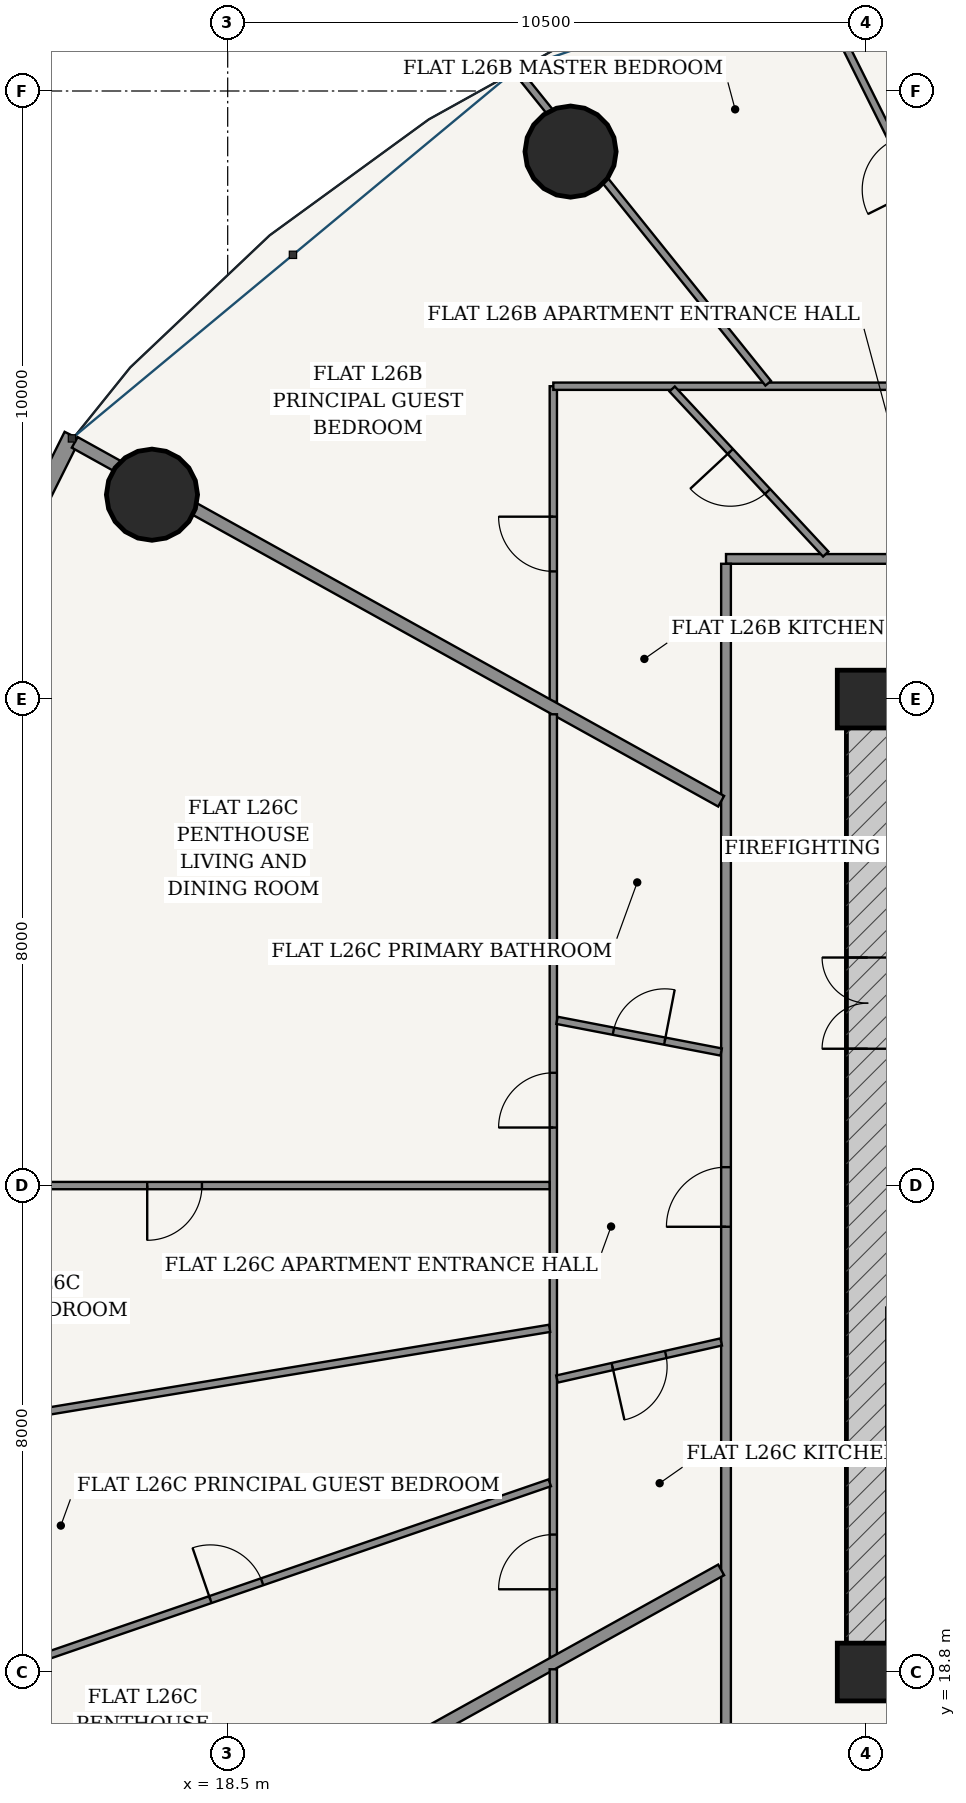
"""IFC4 building model, lengths in metres.
Left out: names, types, materials, properties, quantities, classifications, styles, units other than length and angle.
Written with IfcOpenShell. Run it as: python <this file> out.ifc"""

import sys

from ifc_helpers import new_model, si_unit, direction, frame, frame_2d, origin, origin_2d, place, context, subcontext, project, spatial, rectangle, hollow_circle, extrude, source, transform, mapped, element, fill, save


model = new_model("IFC4")
c1 = context("Model", 3, precision=1e-05, world=origin(), true_north=direction((-0.2419218956, 0.970295726276)))
c2 = subcontext(c1, "Body", "Model", "MODEL_VIEW")
j1 = project(units=[si_unit("LENGTHUNIT", "METRE"), si_unit("PLANEANGLEUNIT", "RADIAN")], contexts=[c1])
p1 = place(None, origin())
s1 = spatial("IfcSite", under=j1, at=p1, CompositionType="ELEMENT")
p2 = place(p1, origin())
s2 = spatial("IfcBuilding", under=s1, at=p2, CompositionType="ELEMENT")
p3 = place(p2, frame((0.0, 0.0, 101.4)))
s3 = spatial("IfcBuildingStorey", under=s2, at=p3, CompositionType="ELEMENT", Elevation=101.4)
for number, where, z_axis, x_axis in (
    (1, (29.0, 18.8, 0.0), (0.0, 0.0, 1.0), (1.0, 0.0, 0.0)),
    (2, (29.0, 34.8, 0.0), (0.0, 0.0, 1.0), (1.0, 0.0, 0.0)),
):
    element("IfcColumn", number, at=place(p3, frame(where, z_axis=z_axis, x_axis=x_axis)), inside=s3, PredefinedType="COLUMN", context=c2, shape_type="SweptSolid", body=[
        extrude(rectangle(XDim=0.95, YDim=0.95, at=origin_2d()), origin(), (0.0, 0.0, 1.0), 3.6),
    ])
p4 = place(p3, frame((28.675, 18.825, 0.0), z_axis=(0.0, 0.0, 1.0), x_axis=(1.0, 0.0, 0.0)))
e3 = element("IfcWall", 3, at=p4, inside=s3, PredefinedType="SHEAR", context=c2, shape_type="SweptSolid", body=[
    extrude(rectangle(XDim=18.65, YDim=0.7, at=frame_2d((9.325, 0.0))), origin(), (0.0, 0.0, 1.0), 3.325),
])
p5 = place(p4, frame((6.877, 0.0, 0.0)))
e4 = element("IfcOpeningElement", 4, at=p5, cuts=e3, PredefinedType="OPENING", context=c2, shape_type="SweptSolid", body=[
    extrude(rectangle(XDim=0.85, YDim=2.1, at=frame_2d((0.425, 1.05))), frame((0.0, 0.36, 0.0), z_axis=(0.0, -1.0, 0.0), x_axis=(1.0, 0.0, 0.0)), (0.0, 0.0, 1.0), 0.72),
])
p6 = place(p4, frame((8.9, 0.0, 0.0)))
e5 = element("IfcOpeningElement", 5, at=p6, cuts=e3, PredefinedType="OPENING", context=c2, shape_type="SweptSolid", body=[
    extrude(rectangle(XDim=0.85, YDim=2.1, at=frame_2d((0.425, 1.05))), frame((0.0, 0.36, 0.0), z_axis=(0.0, -1.0, 0.0), x_axis=(1.0, 0.0, 0.0)), (0.0, 0.0, 1.0), 0.72),
])
p7 = place(p4, frame((10.923, 0.0, 0.0)))
e6 = element("IfcOpeningElement", 6, at=p7, cuts=e3, PredefinedType="OPENING", context=c2, shape_type="SweptSolid", body=[
    extrude(rectangle(XDim=0.85, YDim=2.1, at=frame_2d((0.425, 1.05))), frame((0.0, 0.36, 0.0), z_axis=(0.0, -1.0, 0.0), x_axis=(1.0, 0.0, 0.0)), (0.0, 0.0, 1.0), 0.72),
])
p8 = place(p3, frame((28.675, 34.775, 0.0), z_axis=(0.0, 0.0, 1.0), x_axis=(1.0, 0.0, 0.0)))
e7 = element("IfcWall", 7, at=p8, inside=s3, PredefinedType="SHEAR", context=c2, shape_type="SweptSolid", body=[
    extrude(rectangle(XDim=18.65, YDim=0.7, at=frame_2d((9.325, 0.0))), origin(), (0.0, 0.0, 1.0), 3.325),
])
p9 = place(p8, frame((7.357, 0.0, 0.0)))
e8 = element("IfcOpeningElement", 8, at=p9, cuts=e7, PredefinedType="OPENING", context=c2, shape_type="SweptSolid", body=[
    extrude(rectangle(XDim=0.86, YDim=2.1, at=frame_2d((0.43, 1.05))), frame((0.0, 0.36, 0.0), z_axis=(0.0, -1.0, 0.0), x_axis=(1.0, 0.0, 0.0)), (0.0, 0.0, 1.0), 0.72),
])
p10 = place(p8, frame((10.438, 0.0, 0.0)))
e9 = element("IfcOpeningElement", 9, at=p10, cuts=e7, PredefinedType="OPENING", context=c2, shape_type="SweptSolid", body=[
    extrude(rectangle(XDim=0.85, YDim=2.1, at=frame_2d((0.425, 1.05))), frame((0.0, 0.36, 0.0), z_axis=(0.0, -1.0, 0.0), x_axis=(1.0, 0.0, 0.0)), (0.0, 0.0, 1.0), 0.72),
])
p11 = place(p3, frame((29.025, 19.175, 0.0), z_axis=(0.0, 0.0, 1.0), x_axis=(0.0, 1.0, 0.0)))
e10 = element("IfcWall", 10, at=p11, inside=s3, PredefinedType="SHEAR", context=c2, shape_type="SweptSolid", body=[
    extrude(rectangle(XDim=15.25, YDim=0.7, at=frame_2d((7.625, 0.0))), origin(), (0.0, 0.0, 1.0), 3.325),
])
p12 = place(p11, frame((9.875, 0.0, 0.0)))
e11 = element("IfcOpeningElement", 11, at=p12, cuts=e10, PredefinedType="OPENING", context=c2, shape_type="SweptSolid", body=[
    extrude(rectangle(XDim=1.5, YDim=2.2, at=frame_2d((0.75, 1.1))), frame((0.0, 0.36, 0.0), z_axis=(0.0, -1.0, 0.0), x_axis=(1.0, 0.0, 0.0)), (0.0, 0.0, 1.0), 0.72),
])
for number, where, z_axis, x_axis in (
    (12, (24.138, 43.803, 0.0), (0.0, 0.0, 1.0), (1.0, 0.0, 0.0)),
    (13, (17.255, 38.161, 0.0), (0.0, 0.0, 1.0), (1.0, 0.0, 0.0)),
):
    element("IfcColumn", number, at=place(p3, frame(where, z_axis=z_axis, x_axis=x_axis)), inside=s3, PredefinedType="COLUMN", context=c2, shape_type="SweptSolid", body=[
        extrude(hollow_circle(Radius=0.75, WallThickness=0.045, at=origin_2d()), origin(), (0.0, 0.0, 1.0), 3.6),
    ])
p13 = place(p3, frame((15.944, 39.133, 0.0), z_axis=(0.0, 0.0, 1.0), x_axis=(-0.446263788661, -0.894901464369, 0.0)))
e14 = element("IfcWall", 14, at=p13, inside=s3, PredefinedType="SOLIDWALL", context=c2, shape_type="SweptSolid", body=[
    extrude(rectangle(XDim=9.05, YDim=0.28, at=frame_2d((4.525, 0.0))), origin(), (0.0, 0.0, 1.0), 3.325),
])
p14 = place(p13, frame((1.394, 0.0, 0.85)))
e15 = element("IfcOpeningElement", 15, at=p14, cuts=e14, PredefinedType="OPENING", context=c2, shape_type="SweptSolid", body=[
    extrude(rectangle(XDim=2.1, YDim=1.95, at=frame_2d((1.05, 0.975))), frame((0.0, 0.15, 0.0), z_axis=(0.0, -1.0, 0.0), x_axis=(1.0, 0.0, 0.0)), (0.0, 0.0, 1.0), 0.3),
])
p15 = place(p13, frame((5.557, 0.0, 0.85)))
e16 = element("IfcOpeningElement", 16, at=p15, cuts=e14, PredefinedType="OPENING", context=c2, shape_type="SweptSolid", body=[
    extrude(rectangle(XDim=2.1, YDim=1.95, at=frame_2d((1.05, 0.975))), frame((0.0, 0.15, 0.0), z_axis=(0.0, -1.0, 0.0), x_axis=(1.0, 0.0, 0.0)), (0.0, 0.0, 1.0), 0.3),
])
p16 = place(p3, frame((26.695, 37.105, 0.0), z_axis=(0.0, 0.0, 1.0), x_axis=(1.0, 0.0, 0.0)))
e17 = element("IfcWall", 17, at=p16, inside=s3, PredefinedType="PARTITIONING", context=c2, shape_type="SweptSolid", body=[
    extrude(rectangle(XDim=22.61, YDim=0.16, at=frame_2d((11.305, 0.0))), origin(), (0.0, 0.0, 1.0), 2.767),
])
p17 = place(p16, frame((4.925, 0.0, 0.0)))
e18 = element("IfcOpeningElement", 18, at=p17, cuts=e17, PredefinedType="OPENING", context=c2, shape_type="SweptSolid", body=[
    extrude(rectangle(XDim=0.98, YDim=2.2, at=frame_2d((0.49, 1.1))), frame((0.0, 0.09, 0.0), z_axis=(0.0, -1.0, 0.0), x_axis=(1.0, 0.0, 0.0)), (0.0, 0.0, 1.0), 0.18),
])
p18 = place(p3, frame((26.695, 16.575, 0.0), z_axis=(0.0, 0.0, 1.0), x_axis=(0.0, 1.0, 0.0)))
e19 = element("IfcWall", 19, at=p18, inside=s3, PredefinedType="PARTITIONING", context=c2, shape_type="SweptSolid", body=[
    extrude(rectangle(XDim=20.45, YDim=0.16, at=frame_2d((10.225, 0.0))), origin(), (0.0, 0.0, 1.0), 2.767),
])
p19 = place(p18, frame((9.547, 0.0, 0.0)))
e20 = element("IfcOpeningElement", 20, at=p19, cuts=e19, PredefinedType="OPENING", context=c2, shape_type="SweptSolid", body=[
    extrude(rectangle(XDim=0.98, YDim=2.2, at=frame_2d((0.49, 1.1))), frame((0.0, 0.09, 0.0), z_axis=(0.0, -1.0, 0.0), x_axis=(1.0, 0.0, 0.0)), (0.0, 0.0, 1.0), 0.18),
])
p20 = place(p3, frame((23.855, 34.754, 0.0), z_axis=(0.0, 0.0, 1.0), x_axis=(0.0, 1.0, 0.0)))
e21 = element("IfcWall", 21, at=p20, inside=s3, PredefinedType="PARTITIONING", context=c2, shape_type="SweptSolid", body=[
    extrude(rectangle(XDim=5.191, YDim=0.12, at=frame_2d((2.595, 0.0))), origin(), (0.0, 0.0, 1.0), 3.004),
])
p21 = place(p20, frame((2.145, 0.0, 0.0)))
e22 = element("IfcOpeningElement", 22, at=p21, cuts=e21, PredefinedType="OPENING", context=c2, shape_type="SweptSolid", body=[
    extrude(rectangle(XDim=0.9, YDim=2.15, at=frame_2d((0.45, 1.075))), frame((0.0, 0.07, 0.0), z_axis=(0.0, -1.0, 0.0), x_axis=(1.0, 0.0, 0.0)), (0.0, 0.0, 1.0), 0.14),
])
p22 = place(p3, frame((23.855, 39.945, 0.0), z_axis=(0.0, 0.0, 1.0), x_axis=(1.0, 0.0, 0.0)))
e23 = element("IfcWall", 23, at=p22, inside=s3, PredefinedType="PARTITIONING", context=c2, shape_type="SweptSolid", body=[
    extrude(rectangle(XDim=17.19, YDim=0.12, at=frame_2d((8.595, 0.0))), origin(), (0.0, 0.0, 1.0), 2.767),
])
p23 = place(p22, frame((9.133, 0.0, 0.0)))
e24 = element("IfcOpeningElement", 24, at=p23, cuts=e23, PredefinedType="OPENING", context=c2, shape_type="SweptSolid", body=[
    extrude(rectangle(XDim=0.9, YDim=2.15, at=frame_2d((0.45, 1.075))), frame((0.0, 0.07, 0.0), z_axis=(0.0, -1.0, 0.0), x_axis=(1.0, 0.0, 0.0)), (0.0, 0.0, 1.0), 0.14),
])
p24 = place(p3, frame((31.419, 40.0, 0.0), z_axis=(0.0, 0.0, 1.0), x_axis=(-0.446188142997, 0.894939182877, 0.0)))
e25 = element("IfcWall", 25, at=p24, inside=s3, PredefinedType="PARTITIONING", context=c2, shape_type="SweptSolid", body=[
    extrude(rectangle(XDim=8.002, YDim=0.12, at=frame_2d((4.001, 0.0))), origin(), (0.0, 0.0, 1.0), 2.767),
])
p25 = place(p24, frame((3.551, 0.0, 0.0)))
e26 = element("IfcOpeningElement", 26, at=p25, cuts=e25, PredefinedType="OPENING", context=c2, shape_type="SweptSolid", body=[
    extrude(rectangle(XDim=0.9, YDim=2.15, at=frame_2d((0.45, 1.075))), frame((0.0, 0.07, 0.0), z_axis=(0.0, -1.0, 0.0), x_axis=(1.0, 0.0, 0.0)), (0.0, 0.0, 1.0), 0.14),
])
p26 = place(p3, frame((27.389, 39.993, 0.0), z_axis=(0.0, 0.0, 1.0), x_axis=(-0.626719700294, 0.779244773651, 0.0)))
e27 = element("IfcWall", 27, at=p26, inside=s3, PredefinedType="PARTITIONING", context=c2, shape_type="SweptSolid", body=[
    extrude(rectangle(XDim=6.537, YDim=0.12, at=frame_2d((3.269, 0.0))), origin(), (0.0, 0.0, 1.0), 2.767),
])
p27 = place(p3, frame((28.335, 37.185, 0.0), z_axis=(0.0, 0.0, 1.0), x_axis=(-0.681236086606, 0.732063791145, 0.0)))
e28 = element("IfcWall", 28, at=p27, inside=s3, PredefinedType="PARTITIONING", context=c2, shape_type="SweptSolid", body=[
    extrude(rectangle(XDim=3.708, YDim=0.12, at=frame_2d((1.854, 0.0))), origin(), (0.0, 0.0, 1.0), 2.767),
])
p28 = place(p27, frame((1.404, 0.0, 0.0)))
e29 = element("IfcOpeningElement", 29, at=p28, cuts=e28, PredefinedType="OPENING", context=c2, shape_type="SweptSolid", body=[
    extrude(rectangle(XDim=0.9, YDim=2.15, at=frame_2d((0.45, 1.075))), frame((0.0, 0.07, 0.0), z_axis=(0.0, -1.0, 0.0), x_axis=(1.0, 0.0, 0.0)), (0.0, 0.0, 1.0), 0.14),
])
p29 = place(p3, frame((26.615, 33.12, 0.0), z_axis=(0.0, 0.0, 1.0), x_axis=(-0.874319192772, 0.485351366692, 0.0)))
e30 = element("IfcWall", 30, at=p29, inside=s3, PredefinedType="PARTITIONING", context=c2, shape_type="SweptSolid", body=[
    extrude(rectangle(XDim=12.158, YDim=0.2, at=frame_2d((6.079, 0.0))), origin(), (0.0, 0.0, 1.0), 2.767),
])
p30 = place(p3, frame((23.855, 19.05, 0.0), z_axis=(0.0, 0.0, 1.0), x_axis=(0.0, 1.0, 0.0)))
e31 = element("IfcWall", 31, at=p30, inside=s3, PredefinedType="PARTITIONING", context=c2, shape_type="SweptSolid", body=[
    extrude(rectangle(XDim=15.501, YDim=0.12, at=frame_2d((7.75, 0.0))), origin(), (0.0, 0.0, 1.0), 2.767),
])
p31 = place(p30, frame((8.705, 0.0, 0.0)))
e32 = element("IfcOpeningElement", 32, at=p31, cuts=e31, PredefinedType="OPENING", context=c2, shape_type="SweptSolid", body=[
    extrude(rectangle(XDim=0.9, YDim=2.15, at=frame_2d((0.45, 1.075))), frame((0.0, 0.07, 0.0), z_axis=(0.0, -1.0, 0.0), x_axis=(1.0, 0.0, 0.0)), (0.0, 0.0, 1.0), 0.14),
])
p32 = place(p30, frame((1.111, 0.0, 0.0)))
e33 = element("IfcOpeningElement", 33, at=p32, cuts=e31, PredefinedType="OPENING", context=c2, shape_type="SweptSolid", body=[
    extrude(rectangle(XDim=0.9, YDim=2.15, at=frame_2d((0.45, 1.075))), frame((0.0, 0.07, 0.0), z_axis=(0.0, -1.0, 0.0), x_axis=(1.0, 0.0, 0.0)), (0.0, 0.0, 1.0), 0.14),
])
p33 = place(p3, frame((23.793, 26.8, 0.0), z_axis=(0.0, 0.0, 1.0), x_axis=(-1.0, 0.0, 0.0)))
e34 = element("IfcWall", 34, at=p33, inside=s3, PredefinedType="PARTITIONING", context=c2, shape_type="SweptSolid", body=[
    extrude(rectangle(XDim=12.333, YDim=0.12, at=frame_2d((6.167, 0.0))), origin(), (0.0, 0.0, 1.0), 2.767),
])
p34 = place(p33, frame((5.717, 0.0, 0.0)))
e35 = element("IfcOpeningElement", 35, at=p34, cuts=e34, PredefinedType="OPENING", context=c2, shape_type="SweptSolid", body=[
    extrude(rectangle(XDim=0.9, YDim=2.15, at=frame_2d((0.45, 1.075))), frame((0.0, 0.07, 0.0), z_axis=(0.0, -1.0, 0.0), x_axis=(1.0, 0.0, 0.0)), (0.0, 0.0, 1.0), 0.14),
])
p35 = place(p3, frame((23.794, 24.452, 0.0), z_axis=(0.0, 0.0, 1.0), x_axis=(-0.986620350945, -0.163034607068, 0.0)))
e36 = element("IfcWall", 36, at=p35, inside=s3, PredefinedType="PARTITIONING", context=c2, shape_type="SweptSolid", body=[
    extrude(rectangle(XDim=11.927, YDim=0.12, at=frame_2d((5.964, 0.0))), origin(), (0.0, 0.0, 1.0), 2.767),
])
p36 = place(p3, frame((23.796, 21.912, 0.0), z_axis=(0.0, 0.0, 1.0), x_axis=(-0.945574063861, -0.325406960209, 0.0)))
e37 = element("IfcWall", 37, at=p36, inside=s3, PredefinedType="PARTITIONING", context=c2, shape_type="SweptSolid", body=[
    extrude(rectangle(XDim=10.906, YDim=0.12, at=frame_2d((5.453, 0.0))), origin(), (0.0, 0.0, 1.0), 2.767),
])
p37 = place(p36, frame((5.003, 0.0, 0.0)))
e38 = element("IfcOpeningElement", 38, at=p37, cuts=e37, PredefinedType="OPENING", context=c2, shape_type="SweptSolid", body=[
    extrude(rectangle(XDim=0.9, YDim=2.15, at=frame_2d((0.45, 1.075))), frame((0.0, 0.07, 0.0), z_axis=(0.0, -1.0, 0.0), x_axis=(1.0, 0.0, 0.0)), (0.0, 0.0, 1.0), 0.14),
])
p38 = place(p3, frame((26.615, 28.996, 0.0), z_axis=(0.0, 0.0, 1.0), x_axis=(-0.98189351628, 0.18943368942, 0.0)))
e39 = element("IfcWall", 39, at=p38, inside=s3, PredefinedType="PARTITIONING", context=c2, shape_type="SweptSolid", body=[
    extrude(rectangle(XDim=2.749, YDim=0.12, at=frame_2d((1.375, 0.0))), origin(), (0.0, 0.0, 1.0), 3.325),
])
p39 = place(p38, frame((0.944, 0.0, 0.0)))
e40 = element("IfcOpeningElement", 40, at=p39, cuts=e39, PredefinedType="OPENING", context=c2, shape_type="SweptSolid", body=[
    extrude(rectangle(XDim=0.86, YDim=2.15, at=frame_2d((0.43, 1.075))), frame((0.0, 0.07, 0.0), z_axis=(0.0, -1.0, 0.0), x_axis=(1.0, 0.0, 0.0)), (0.0, 0.0, 1.0), 0.14),
])
p40 = place(p3, frame((26.615, 24.228, 0.0), z_axis=(0.0, 0.0, 1.0), x_axis=(-0.975417151515, -0.220366468706, 0.0)))
e41 = element("IfcWall", 41, at=p40, inside=s3, PredefinedType="PARTITIONING", context=c2, shape_type="SweptSolid", body=[
    extrude(rectangle(XDim=2.768, YDim=0.12, at=frame_2d((1.384, 0.0))), origin(), (0.0, 0.0, 1.0), 3.325),
])
p41 = place(p40, frame((0.934, 0.0, 0.0)))
e42 = element("IfcOpeningElement", 42, at=p41, cuts=e41, PredefinedType="OPENING", context=c2, shape_type="SweptSolid", body=[
    extrude(rectangle(XDim=0.9, YDim=2.15, at=frame_2d((0.45, 1.075))), frame((0.0, 0.07, 0.0), z_axis=(0.0, -1.0, 0.0), x_axis=(1.0, 0.0, 0.0)), (0.0, 0.0, 1.0), 0.14),
])
p42 = place(p3, frame((26.615, 20.48, 0.0), z_axis=(0.0, 0.0, 1.0), x_axis=(-0.874310671773, -0.48536671623, 0.0)))
e43 = element("IfcWall", 43, at=p42, inside=s3, PredefinedType="PARTITIONING", context=c2, shape_type="SweptSolid", body=[
    extrude(rectangle(XDim=12.159, YDim=0.2, at=frame_2d((6.079, 0.0))), origin(), (0.0, 0.0, 1.0), 2.767),
])
p43 = place(p3, frame((23.855, 13.655, 0.0), z_axis=(0.0, 0.0, 1.0), x_axis=(0.0, 1.0, 0.0)))
e44 = element("IfcWall", 44, at=p43, inside=s3, PredefinedType="PARTITIONING", context=c2, shape_type="SweptSolid", body=[
    extrude(rectangle(XDim=5.19, YDim=0.12, at=frame_2d((2.595, 0.0))), origin(), (0.0, 0.0, 1.0), 3.004),
])
m1 = source(origin(), c2, "Body", "SweptSolid", [
    extrude(rectangle(XDim=1.5, YDim=2.2, at=frame_2d((0.75, 1.1))), frame((0.0, 0.025, 0.0), z_axis=(0.0, -1.0, 0.0), x_axis=(1.0, 0.0, 0.0)), (0.0, 0.0, 1.0), 0.05),
])
p44 = place(p12, origin())
e45 = element("IfcDoor", 45, at=p44, inside=s3, OperationType="DOUBLE_DOOR_SINGLE_SWING", PredefinedType="DOOR", context=c2, shape_type="MappedRepresentation", body=[
    mapped(m1, transform((0.0, 0.0, 0.0), scale=1.0)),
])
fill(e11, e45)
m2 = source(origin(), c2, "Body", "SweptSolid", [
    extrude(rectangle(XDim=0.9, YDim=2.15, at=frame_2d((0.45, 1.075))), frame((0.0, 0.025, 0.0), z_axis=(0.0, -1.0, 0.0), x_axis=(1.0, 0.0, 0.0)), (0.0, 0.0, 1.0), 0.05),
])
p45 = place(p28, origin())
e46 = element("IfcDoor", 46, at=p45, inside=s3, OperationType="SINGLE_SWING_RIGHT", PredefinedType="DOOR", context=c2, shape_type="MappedRepresentation", body=[
    mapped(m2, transform((0.0, 0.0, 0.0), scale=1.0)),
])
fill(e29, e46)
p46 = place(p21, origin())
e47 = element("IfcDoor", 47, at=p46, inside=s3, OperationType="SINGLE_SWING_RIGHT", PredefinedType="DOOR", context=c2, shape_type="MappedRepresentation", body=[
    mapped(m2, transform((0.0, 0.0, 0.0), scale=1.0)),
])
fill(e22, e47)
m3 = source(origin(), c2, "Body", "SweptSolid", [
    extrude(rectangle(XDim=0.98, YDim=2.2, at=frame_2d((0.49, 1.1))), frame((0.0, 0.025, 0.0), z_axis=(0.0, -1.0, 0.0), x_axis=(1.0, 0.0, 0.0)), (0.0, 0.0, 1.0), 0.05),
])
p47 = place(p19, origin())
e48 = element("IfcDoor", 48, at=p47, inside=s3, OperationType="SINGLE_SWING_LEFT", PredefinedType="DOOR", context=c2, shape_type="MappedRepresentation", body=[
    mapped(m3, transform((0.0, 0.0, 0.0), scale=1.0)),
])
fill(e20, e48)
m4 = source(origin(), c2, "Body", "SweptSolid", [
    extrude(rectangle(XDim=0.86, YDim=2.15, at=frame_2d((0.43, 1.075))), frame((0.0, 0.025, 0.0), z_axis=(0.0, -1.0, 0.0), x_axis=(1.0, 0.0, 0.0)), (0.0, 0.0, 1.0), 0.05),
])
p48 = place(p39, frame((0.86, 0.0, 0.0), z_axis=(0.0, 0.0, 1.0), x_axis=(-1.0, 0.0, 0.0)))
e49 = element("IfcDoor", 49, at=p48, inside=s3, OperationType="SINGLE_SWING_RIGHT", PredefinedType="DOOR", context=c2, shape_type="MappedRepresentation", body=[
    mapped(m4, transform((0.0, 0.0, 0.0), scale=1.0)),
])
fill(e40, e49)
p49 = place(p31, origin())
e50 = element("IfcDoor", 50, at=p49, inside=s3, OperationType="SINGLE_SWING_LEFT", PredefinedType="DOOR", context=c2, shape_type="MappedRepresentation", body=[
    mapped(m2, transform((0.0, 0.0, 0.0), scale=1.0)),
])
fill(e32, e50)
p50 = place(p41, origin())
e51 = element("IfcDoor", 51, at=p50, inside=s3, OperationType="SINGLE_SWING_RIGHT", PredefinedType="DOOR", context=c2, shape_type="MappedRepresentation", body=[
    mapped(m2, transform((0.0, 0.0, 0.0), scale=1.0)),
])
fill(e42, e51)
p51 = place(p32, origin())
e52 = element("IfcDoor", 52, at=p51, inside=s3, OperationType="SINGLE_SWING_LEFT", PredefinedType="DOOR", context=c2, shape_type="MappedRepresentation", body=[
    mapped(m2, transform((0.0, 0.0, 0.0), scale=1.0)),
])
fill(e33, e52)
p52 = place(p34, origin())
e53 = element("IfcDoor", 53, at=p52, inside=s3, OperationType="SINGLE_SWING_RIGHT", PredefinedType="DOOR", context=c2, shape_type="MappedRepresentation", body=[
    mapped(m2, transform((0.0, 0.0, 0.0), scale=1.0)),
])
fill(e35, e53)
p53 = place(p37, frame((0.9, 0.0, 0.0), z_axis=(0.0, 0.0, 1.0), x_axis=(-1.0, 0.0, 0.0)))
e54 = element("IfcDoor", 54, at=p53, inside=s3, OperationType="SINGLE_SWING_LEFT", PredefinedType="DOOR", context=c2, shape_type="MappedRepresentation", body=[
    mapped(m2, transform((0.0, 0.0, 0.0), scale=1.0)),
])
fill(e38, e54)
save(model, sys.argv[1])
